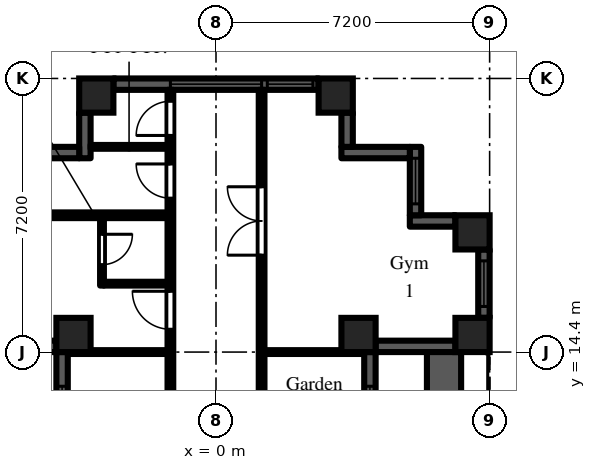
"""IFC4 building model, lengths in metres.
Left out: names, types, materials, properties, quantities, classifications, styles, units other than length and angle.
Written with IfcOpenShell. Run it as: python <this file> out.ifc"""

import sys

from ifc_helpers import new_model, si_unit, direction, frame, frame_2d, origin, origin_2d, place, context, subcontext, project, spatial, rectangle, extrude, element, fill, save


model = new_model("IFC4")
c1 = context("Model", 3, precision=1e-05, world=origin(), true_north=direction((0.0, 1.0)))
c2 = subcontext(c1, "Body", "Model", "MODEL_VIEW")
j1 = project(units=[si_unit("LENGTHUNIT", "METRE"), si_unit("PLANEANGLEUNIT", "RADIAN")], contexts=[c1])
p1 = place(None, origin())
s1 = spatial("IfcSite", under=j1, at=p1, CompositionType="ELEMENT")
p2 = place(p1, origin())
s2 = spatial("IfcBuilding", under=s1, at=p2, CompositionType="ELEMENT")
p3 = place(p2, frame((0.0, 0.0, 75.9)))
s3 = spatial("IfcBuildingStorey", under=s2, at=p3, CompositionType="ELEMENT", Elevation=75.9)
for number, where, z_axis, x_axis in (
    (1, (-3.75, 14.85, 0.0), (0.0, 0.0, 1.0), (1.0, 0.0, 0.0)),
    (2, (-3.15, 21.15, 0.0), (0.0, 0.0, 1.0), (1.0, 0.0, 0.0)),
    (3, (3.15, 21.15, 0.0), (0.0, 0.0, 1.0), (1.0, 0.0, 0.0)),
    (4, (3.75, 14.85, 0.0), (0.0, 0.0, 1.0), (1.0, 0.0, 0.0)),
    (5, (6.75, 14.85, 0.0), (0.0, 0.0, 1.0), (1.0, 0.0, 0.0)),
    (6, (6.75, 17.55, 0.0), (0.0, 0.0, 1.0), (1.0, 0.0, 0.0)),
):
    element("IfcColumn", number, at=place(p3, frame(where, z_axis=z_axis, x_axis=x_axis)), inside=s3, PredefinedType="COLUMN", context=c2, shape_type="SweptSolid", body=[
        extrude(rectangle(XDim=0.9, YDim=0.9, at=origin_2d()), origin(), (0.0, 0.0, 1.0), 3.0),
    ])
p4 = place(p3, frame((4.05, 7.2, 0.0), z_axis=(0.0, 0.0, 1.0), x_axis=(0.0, 1.0, 0.0)))
e7 = element("IfcWall", 7, at=p4, inside=s3, PredefinedType="SOLIDWALL", context=c2, shape_type="SweptSolid", body=[
    extrude(rectangle(XDim=7.2, YDim=0.3, at=frame_2d((3.6, 0.0))), origin(), (0.0, 0.0, 1.0), 2.1),
])
p5 = place(p4, frame((3.0, 0.0, 0.0)))
e8 = element("IfcOpeningElement", 8, at=p5, cuts=e7, PredefinedType="OPENING", context=c2, shape_type="SweptSolid", body=[
    extrude(rectangle(XDim=1.2, YDim=2.05, at=frame_2d((0.6, 1.025))), frame((0.0, 0.16, 0.0), z_axis=(0.0, -1.0, 0.0), x_axis=(1.0, 0.0, 0.0)), (0.0, 0.0, 1.0), 0.32),
])
p6 = place(p4, frame((0.9, 0.0, 0.2)))
e9 = element("IfcOpeningElement", 9, at=p6, cuts=e7, PredefinedType="OPENING", context=c2, shape_type="SweptSolid", body=[
    extrude(rectangle(XDim=1.8, YDim=1.85, at=frame_2d((0.9, 0.925))), frame((0.0, 0.16, 0.0), z_axis=(0.0, -1.0, 0.0), x_axis=(1.0, 0.0, 0.0)), (0.0, 0.0, 1.0), 0.32),
])
p7 = place(p4, frame((4.5, 0.0, 0.2)))
e10 = element("IfcOpeningElement", 10, at=p7, cuts=e7, PredefinedType="OPENING", context=c2, shape_type="SweptSolid", body=[
    extrude(rectangle(XDim=1.8, YDim=1.85, at=frame_2d((0.9, 0.925))), frame((0.0, 0.16, 0.0), z_axis=(0.0, -1.0, 0.0), x_axis=(1.0, 0.0, 0.0)), (0.0, 0.0, 1.0), 0.32),
])
p8 = place(p3, frame((4.2, 14.55, 0.0), z_axis=(0.0, 0.0, 1.0), x_axis=(1.0, 0.0, 0.0)))
e11 = element("IfcWall", 11, at=p8, inside=s3, PredefinedType="SOLIDWALL", context=c2, shape_type="SweptSolid", body=[
    extrude(rectangle(XDim=2.1, YDim=0.3, at=frame_2d((1.05, 0.0))), origin(), (0.0, 0.0, 1.0), 2.1),
])
p9 = place(p3, frame((7.05, 15.3, 0.0), z_axis=(0.0, 0.0, 1.0), x_axis=(0.0, 1.0, 0.0)))
e12 = element("IfcWall", 12, at=p9, inside=s3, PredefinedType="SOLIDWALL", context=c2, shape_type="SweptSolid", body=[
    extrude(rectangle(XDim=1.8, YDim=0.3, at=frame_2d((0.9, 0.0))), origin(), (0.0, 0.0, 1.0), 2.1),
])
p10 = place(p9, frame((0.3, 0.0, 0.2)))
e13 = element("IfcOpeningElement", 13, at=p10, cuts=e12, PredefinedType="OPENING", context=c2, shape_type="SweptSolid", body=[
    extrude(rectangle(XDim=1.2, YDim=1.85, at=frame_2d((0.6, 0.925))), frame((0.0, 0.16, 0.0), z_axis=(0.0, -1.0, 0.0), x_axis=(1.0, 0.0, 0.0)), (0.0, 0.0, 1.0), 0.32),
])
p11 = place(p3, frame((6.3, 17.85, 0.0), z_axis=(0.0, 0.0, 1.0), x_axis=(-1.0, 0.0, 0.0)))
e14 = element("IfcWall", 14, at=p11, inside=s3, PredefinedType="SOLIDWALL", context=c2, shape_type="SweptSolid", body=[
    extrude(rectangle(XDim=1.2, YDim=0.3, at=frame_2d((0.6, 0.0))), origin(), (0.0, 0.0, 1.0), 2.575),
])
p12 = place(p3, frame((5.25, 18.0, 0.0), z_axis=(0.0, 0.0, 1.0), x_axis=(0.0, 1.0, 0.0)))
e15 = element("IfcWall", 15, at=p12, inside=s3, PredefinedType="SOLIDWALL", context=c2, shape_type="SweptSolid", body=[
    extrude(rectangle(XDim=1.8, YDim=0.3, at=frame_2d((0.9, 0.0))), origin(), (0.0, 0.0, 1.0), 2.575),
])
p13 = place(p12, frame((0.3, 0.0, 0.2)))
e16 = element("IfcOpeningElement", 16, at=p13, cuts=e15, PredefinedType="OPENING", context=c2, shape_type="SweptSolid", body=[
    extrude(rectangle(XDim=1.2, YDim=1.85, at=frame_2d((0.6, 0.925))), frame((0.0, 0.16, 0.0), z_axis=(0.0, -1.0, 0.0), x_axis=(1.0, 0.0, 0.0)), (0.0, 0.0, 1.0), 0.32),
])
p14 = place(p3, frame((5.1, 19.65, 0.0), z_axis=(0.0, 0.0, 1.0), x_axis=(-1.0, 0.0, 0.0)))
e17 = element("IfcWall", 17, at=p14, inside=s3, PredefinedType="SOLIDWALL", context=c2, shape_type="SweptSolid", body=[
    extrude(rectangle(XDim=1.8, YDim=0.3, at=frame_2d((0.9, 0.0))), origin(), (0.0, 0.0, 1.0), 2.575),
])
p15 = place(p3, frame((3.45, 19.8, 0.0), z_axis=(0.0, 0.0, 1.0), x_axis=(0.0, 1.0, 0.0)))
e18 = element("IfcWall", 18, at=p15, inside=s3, PredefinedType="SOLIDWALL", context=c2, shape_type="SweptSolid", body=[
    extrude(rectangle(XDim=0.9, YDim=0.3, at=frame_2d((0.45, 0.0))), origin(), (0.0, 0.0, 1.0), 2.575),
])
p16 = place(p3, frame((2.7, 21.45, 0.0), z_axis=(0.0, 0.0, 1.0), x_axis=(-1.0, 0.0, 0.0)))
e19 = element("IfcWall", 19, at=p16, inside=s3, PredefinedType="SOLIDWALL", context=c2, shape_type="SweptSolid", body=[
    extrude(rectangle(XDim=5.4, YDim=0.3, at=frame_2d((2.7, 0.0))), origin(), (0.0, 0.0, 1.0), 2.1),
])
p17 = place(p16, frame((1.5, 0.0, 0.2)))
e20 = element("IfcOpeningElement", 20, at=p17, cuts=e19, PredefinedType="OPENING", context=c2, shape_type="SweptSolid", body=[
    extrude(rectangle(XDim=2.4, YDim=1.85, at=frame_2d((1.2, 0.925))), frame((0.0, 0.16, 0.0), z_axis=(0.0, -1.0, 0.0), x_axis=(1.0, 0.0, 0.0)), (0.0, 0.0, 1.0), 0.32),
])
p18 = place(p16, frame((0.15, 0.0, 0.2)))
e21 = element("IfcOpeningElement", 21, at=p18, cuts=e19, PredefinedType="OPENING", context=c2, shape_type="SweptSolid", body=[
    extrude(rectangle(XDim=1.2, YDim=1.85, at=frame_2d((0.6, 0.925))), frame((0.0, 0.16, 0.0), z_axis=(0.0, -1.0, 0.0), x_axis=(1.0, 0.0, 0.0)), (0.0, 0.0, 1.0), 0.32),
])
p19 = place(p3, frame((-3.45, 20.7, 0.0), z_axis=(0.0, 0.0, 1.0), x_axis=(0.0, -1.0, 0.0)))
e22 = element("IfcWall", 22, at=p19, inside=s3, PredefinedType="SOLIDWALL", context=c2, shape_type="SweptSolid", body=[
    extrude(rectangle(XDim=1.2, YDim=0.3, at=frame_2d((0.6, 0.0))), origin(), (0.0, 0.0, 1.0), 2.575),
])
p20 = place(p3, frame((-3.6, 19.65, 0.0), z_axis=(0.0, 0.0, 1.0), x_axis=(-1.0, 0.0, 0.0)))
e23 = element("IfcWall", 23, at=p20, inside=s3, PredefinedType="SOLIDWALL", context=c2, shape_type="SweptSolid", body=[
    extrude(rectangle(XDim=1.8, YDim=0.3, at=frame_2d((0.9, 0.0))), origin(), (0.0, 0.0, 1.0), 2.575),
])
p21 = place(p3, frame((-6.3, 14.55, 0.0), z_axis=(0.0, 0.0, 1.0), x_axis=(1.0, 0.0, 0.0)))
e24 = element("IfcWall", 24, at=p21, inside=s3, PredefinedType="SOLIDWALL", context=c2, shape_type="SweptSolid", body=[
    extrude(rectangle(XDim=2.1, YDim=0.3, at=frame_2d((1.05, 0.0))), origin(), (0.0, 0.0, 1.0), 2.1),
])
p22 = place(p3, frame((-4.05, 14.4, 0.0), z_axis=(0.0, 0.0, 1.0), x_axis=(0.0, -1.0, 0.0)))
e25 = element("IfcWall", 25, at=p22, inside=s3, PredefinedType="SOLIDWALL", context=c2, shape_type="SweptSolid", body=[
    extrude(rectangle(XDim=7.2, YDim=0.3, at=frame_2d((3.6, 0.0))), origin(), (0.0, 0.0, 1.0), 2.1),
])
p23 = place(p22, frame((3.0, 0.0, 0.0)))
e26 = element("IfcOpeningElement", 26, at=p23, cuts=e25, PredefinedType="OPENING", context=c2, shape_type="SweptSolid", body=[
    extrude(rectangle(XDim=1.2, YDim=2.05, at=frame_2d((0.6, 1.025))), frame((0.0, 0.16, 0.0), z_axis=(0.0, -1.0, 0.0), x_axis=(1.0, 0.0, 0.0)), (0.0, 0.0, 1.0), 0.32),
])
p24 = place(p22, frame((0.9, 0.0, 0.2)))
e27 = element("IfcOpeningElement", 27, at=p24, cuts=e25, PredefinedType="OPENING", context=c2, shape_type="SweptSolid", body=[
    extrude(rectangle(XDim=1.8, YDim=1.85, at=frame_2d((0.9, 0.925))), frame((0.0, 0.16, 0.0), z_axis=(0.0, -1.0, 0.0), x_axis=(1.0, 0.0, 0.0)), (0.0, 0.0, 1.0), 0.32),
])
p25 = place(p22, frame((4.5, 0.0, 0.2)))
e28 = element("IfcOpeningElement", 28, at=p25, cuts=e25, PredefinedType="OPENING", context=c2, shape_type="SweptSolid", body=[
    extrude(rectangle(XDim=1.8, YDim=1.85, at=frame_2d((0.9, 0.925))), frame((0.0, 0.16, 0.0), z_axis=(0.0, -1.0, 0.0), x_axis=(1.0, 0.0, 0.0)), (0.0, 0.0, 1.0), 0.32),
])
p26 = place(p3, frame((6.0, 7.2, 0.0), z_axis=(0.0, 0.0, 1.0), x_axis=(0.0, 1.0, 0.0)))
e29 = element("IfcWall", 29, at=p26, inside=s3, PredefinedType="PARAPET", context=c2, shape_type="SweptSolid", body=[
    extrude(rectangle(XDim=7.2, YDim=0.9, at=frame_2d((3.6, 0.0))), origin(), (0.0, 0.0, 1.0), 0.8),
])
p27 = place(p3, frame((-5.1, 18.0, 0.0), z_axis=(0.0, 0.0, 1.0), x_axis=(1.0, 0.0, 0.0)))
e30 = element("IfcWall", 30, at=p27, inside=s3, PredefinedType="PARTITIONING", context=c2, shape_type="SweptSolid", body=[
    extrude(rectangle(XDim=3.825, YDim=0.15, at=frame_2d((1.913, 0.0))), origin(), (0.0, 0.0, 1.0), 2.575),
])
p28 = place(p3, frame((-3.9, 14.4, 0.0), z_axis=(0.0, 0.0, 1.0), x_axis=(1.0, 0.0, 0.0)))
e31 = element("IfcWall", 31, at=p28, inside=s3, PredefinedType="PARTITIONING", context=c2, shape_type="SweptSolid", body=[
    extrude(rectangle(XDim=2.625, YDim=0.1, at=frame_2d((1.312, 0.0))), origin(), (0.0, 0.0, 1.0), 2.575),
])
p29 = place(p3, frame((-3.3, 19.8, 0.0), z_axis=(0.0, 0.0, 1.0), x_axis=(1.0, 0.0, 0.0)))
e32 = element("IfcWall", 32, at=p29, inside=s3, PredefinedType="PARTITIONING", context=c2, shape_type="SweptSolid", body=[
    extrude(rectangle(XDim=2.025, YDim=0.1, at=frame_2d((1.013, 0.0))), origin(), (0.0, 0.0, 1.0), 2.575),
])
p30 = place(p3, frame((-3.0, 16.15, 0.0), z_axis=(0.0, 0.0, 1.0), x_axis=(0.0, 1.0, 0.0)))
e33 = element("IfcWall", 33, at=p30, inside=s3, PredefinedType="PARTITIONING", context=c2, shape_type="SweptSolid", body=[
    extrude(rectangle(XDim=1.775, YDim=0.1, at=frame_2d((0.888, 0.0))), origin(), (0.0, 0.0, 1.0), 2.575),
])
p31 = place(p30, frame((0.55, 0.0, 0.0)))
e34 = element("IfcOpeningElement", 34, at=p31, cuts=e33, PredefinedType="OPENING", context=c2, shape_type="SweptSolid", body=[
    extrude(rectangle(XDim=0.8, YDim=2.1, at=frame_2d((0.4, 1.05))), frame((0.0, 0.06, 0.0), z_axis=(0.0, -1.0, 0.0), x_axis=(1.0, 0.0, 0.0)), (0.0, 0.0, 1.0), 0.12),
])
p32 = place(p3, frame((-2.95, 16.2, 0.0), z_axis=(0.0, 0.0, 1.0), x_axis=(1.0, 0.0, 0.0)))
e35 = element("IfcWall", 35, at=p32, inside=s3, PredefinedType="PARTITIONING", context=c2, shape_type="SweptSolid", body=[
    extrude(rectangle(XDim=1.675, YDim=0.1, at=frame_2d((0.837, 0.0))), origin(), (0.0, 0.0, 1.0), 2.575),
])
p33 = place(p3, frame((-1.2, 1.275, 0.0), z_axis=(0.0, 0.0, 1.0), x_axis=(0.0, 1.0, 0.0)))
e36 = element("IfcWall", 36, at=p33, inside=s3, PredefinedType="PARTITIONING", context=c2, shape_type="SweptSolid", body=[
    extrude(rectangle(XDim=20.025, YDim=0.15, at=frame_2d((10.013, 0.0))), origin(), (0.0, 0.0, 1.0), 2.575),
])
p34 = place(p33, frame((2.475, 0.0, 0.0)))
e37 = element("IfcOpeningElement", 37, at=p34, cuts=e36, PredefinedType="OPENING", context=c2, shape_type="SweptSolid", body=[
    extrude(rectangle(XDim=0.9, YDim=2.1, at=frame_2d((0.45, 1.05))), frame((0.0, 0.085, 0.0), z_axis=(0.0, -1.0, 0.0), x_axis=(1.0, 0.0, 0.0)), (0.0, 0.0, 1.0), 0.17),
])
p35 = place(p33, frame((10.875, 0.0, 0.0)))
e38 = element("IfcOpeningElement", 38, at=p35, cuts=e36, PredefinedType="OPENING", context=c2, shape_type="SweptSolid", body=[
    extrude(rectangle(XDim=0.9, YDim=2.1, at=frame_2d((0.45, 1.05))), frame((0.0, 0.085, 0.0), z_axis=(0.0, -1.0, 0.0), x_axis=(1.0, 0.0, 0.0)), (0.0, 0.0, 1.0), 0.17),
])
p36 = place(p33, frame((13.725, 0.0, 0.0)))
e39 = element("IfcOpeningElement", 39, at=p36, cuts=e36, PredefinedType="OPENING", context=c2, shape_type="SweptSolid", body=[
    extrude(rectangle(XDim=1.0, YDim=2.1, at=frame_2d((0.5, 1.05))), frame((0.0, 0.085, 0.0), z_axis=(0.0, -1.0, 0.0), x_axis=(1.0, 0.0, 0.0)), (0.0, 0.0, 1.0), 0.17),
])
p37 = place(p33, frame((17.175, 0.0, 0.0)))
e40 = element("IfcOpeningElement", 40, at=p37, cuts=e36, PredefinedType="OPENING", context=c2, shape_type="SweptSolid", body=[
    extrude(rectangle(XDim=0.9, YDim=2.1, at=frame_2d((0.45, 1.05))), frame((0.0, 0.085, 0.0), z_axis=(0.0, -1.0, 0.0), x_axis=(1.0, 0.0, 0.0)), (0.0, 0.0, 1.0), 0.17),
])
p38 = place(p33, frame((18.825, 0.0, 0.0)))
e41 = element("IfcOpeningElement", 41, at=p38, cuts=e36, PredefinedType="OPENING", context=c2, shape_type="SweptSolid", body=[
    extrude(rectangle(XDim=0.9, YDim=2.1, at=frame_2d((0.45, 1.05))), frame((0.0, 0.085, 0.0), z_axis=(0.0, -1.0, 0.0), x_axis=(1.0, 0.0, 0.0)), (0.0, 0.0, 1.0), 0.17),
])
p39 = place(p3, frame((1.2, 1.125, 0.0), z_axis=(0.0, 0.0, 1.0), x_axis=(0.0, 1.0, 0.0)))
e42 = element("IfcWall", 42, at=p39, inside=s3, PredefinedType="PARTITIONING", context=c2, shape_type="SweptSolid", body=[
    extrude(rectangle(XDim=20.175, YDim=0.15, at=frame_2d((10.087, 0.0))), origin(), (0.0, 0.0, 1.0), 2.575),
])
p40 = place(p39, frame((2.625, 0.0, 0.0)))
e43 = element("IfcOpeningElement", 43, at=p40, cuts=e42, PredefinedType="OPENING", context=c2, shape_type="SweptSolid", body=[
    extrude(rectangle(XDim=0.9, YDim=2.1, at=frame_2d((0.45, 1.05))), frame((0.0, 0.085, 0.0), z_axis=(0.0, -1.0, 0.0), x_axis=(1.0, 0.0, 0.0)), (0.0, 0.0, 1.0), 0.17),
])
p41 = place(p39, frame((7.425, 0.0, 0.0)))
e44 = element("IfcOpeningElement", 44, at=p41, cuts=e42, PredefinedType="OPENING", context=c2, shape_type="SweptSolid", body=[
    extrude(rectangle(XDim=0.9, YDim=2.1, at=frame_2d((0.45, 1.05))), frame((0.0, 0.085, 0.0), z_axis=(0.0, -1.0, 0.0), x_axis=(1.0, 0.0, 0.0)), (0.0, 0.0, 1.0), 0.17),
])
p42 = place(p39, frame((15.825, 0.0, 0.0)))
e45 = element("IfcOpeningElement", 45, at=p42, cuts=e42, PredefinedType="OPENING", context=c2, shape_type="SweptSolid", body=[
    extrude(rectangle(XDim=1.8, YDim=2.1, at=frame_2d((0.9, 1.05))), frame((0.0, 0.085, 0.0), z_axis=(0.0, -1.0, 0.0), x_axis=(1.0, 0.0, 0.0)), (0.0, 0.0, 1.0), 0.17),
])
p43 = place(p3, frame((1.275, 14.4, 0.0), z_axis=(0.0, 0.0, 1.0), x_axis=(1.0, 0.0, 0.0)))
e46 = element("IfcWall", 46, at=p43, inside=s3, PredefinedType="PARTITIONING", context=c2, shape_type="SweptSolid", body=[
    extrude(rectangle(XDim=2.625, YDim=0.1, at=frame_2d((1.312, 0.0))), origin(), (0.0, 0.0, 1.0), 2.575),
])
p44 = place(p7, origin())
e47 = element("IfcWindow", 47, at=p44, inside=s3, PartitioningType="SINGLE_PANEL", PredefinedType="WINDOW", context=c2, shape_type="SweptSolid", body=[
    extrude(rectangle(XDim=1.8, YDim=1.85, at=frame_2d((0.9, 0.925))), frame((0.0, 0.03, 0.0), z_axis=(0.0, -1.0, 0.0), x_axis=(1.0, 0.0, 0.0)), (0.0, 0.0, 1.0), 0.06),
])
fill(e10, e47)
p45 = place(p10, origin())
e48 = element("IfcWindow", 48, at=p45, inside=s3, PartitioningType="SINGLE_PANEL", PredefinedType="WINDOW", context=c2, shape_type="SweptSolid", body=[
    extrude(rectangle(XDim=1.2, YDim=1.85, at=frame_2d((0.6, 0.925))), frame((0.0, 0.03, 0.0), z_axis=(0.0, -1.0, 0.0), x_axis=(1.0, 0.0, 0.0)), (0.0, 0.0, 1.0), 0.06),
])
fill(e13, e48)
p46 = place(p13, origin())
e49 = element("IfcWindow", 49, at=p46, inside=s3, PartitioningType="SINGLE_PANEL", PredefinedType="WINDOW", context=c2, shape_type="SweptSolid", body=[
    extrude(rectangle(XDim=1.2, YDim=1.85, at=frame_2d((0.6, 0.925))), frame((0.0, 0.03, 0.0), z_axis=(0.0, -1.0, 0.0), x_axis=(1.0, 0.0, 0.0)), (0.0, 0.0, 1.0), 0.06),
])
fill(e16, e49)
p47 = place(p17, origin())
e50 = element("IfcWindow", 50, at=p47, inside=s3, PartitioningType="SINGLE_PANEL", PredefinedType="WINDOW", context=c2, shape_type="SweptSolid", body=[
    extrude(rectangle(XDim=2.4, YDim=1.85, at=frame_2d((1.2, 0.925))), frame((0.0, 0.03, 0.0), z_axis=(0.0, -1.0, 0.0), x_axis=(1.0, 0.0, 0.0)), (0.0, 0.0, 1.0), 0.06),
])
fill(e20, e50)
p48 = place(p18, origin())
e51 = element("IfcWindow", 51, at=p48, inside=s3, PartitioningType="SINGLE_PANEL", PredefinedType="WINDOW", context=c2, shape_type="SweptSolid", body=[
    extrude(rectangle(XDim=1.2, YDim=1.85, at=frame_2d((0.6, 0.925))), frame((0.0, 0.03, 0.0), z_axis=(0.0, -1.0, 0.0), x_axis=(1.0, 0.0, 0.0)), (0.0, 0.0, 1.0), 0.06),
])
fill(e21, e51)
p49 = place(p24, origin())
e52 = element("IfcWindow", 52, at=p49, inside=s3, PartitioningType="SINGLE_PANEL", PredefinedType="WINDOW", context=c2, shape_type="SweptSolid", body=[
    extrude(rectangle(XDim=1.8, YDim=1.85, at=frame_2d((0.9, 0.925))), frame((0.0, 0.03, 0.0), z_axis=(0.0, -1.0, 0.0), x_axis=(1.0, 0.0, 0.0)), (0.0, 0.0, 1.0), 0.06),
])
fill(e27, e52)
p50 = place(p31, frame((0.8, 0.0, 0.0), z_axis=(0.0, 0.0, 1.0), x_axis=(-1.0, 0.0, 0.0)))
e53 = element("IfcDoor", 53, at=p50, inside=s3, OperationType="SINGLE_SWING_LEFT", PredefinedType="DOOR", context=c2, shape_type="SweptSolid", body=[
    extrude(rectangle(XDim=0.8, YDim=2.1, at=frame_2d((0.4, 1.05))), frame((0.0, 0.025, 0.0), z_axis=(0.0, -1.0, 0.0), x_axis=(1.0, 0.0, 0.0)), (0.0, 0.0, 1.0), 0.05),
])
fill(e34, e53)
p51 = place(p36, origin())
e54 = element("IfcDoor", 54, at=p51, inside=s3, OperationType="SINGLE_SWING_RIGHT", PredefinedType="DOOR", context=c2, shape_type="SweptSolid", body=[
    extrude(rectangle(XDim=1.0, YDim=2.1, at=frame_2d((0.5, 1.05))), frame((0.0, 0.025, 0.0), z_axis=(0.0, -1.0, 0.0), x_axis=(1.0, 0.0, 0.0)), (0.0, 0.0, 1.0), 0.05),
])
fill(e39, e54)
p52 = place(p37, origin())
e55 = element("IfcDoor", 55, at=p52, inside=s3, OperationType="SINGLE_SWING_RIGHT", PredefinedType="DOOR", context=c2, shape_type="SweptSolid", body=[
    extrude(rectangle(XDim=0.9, YDim=2.1, at=frame_2d((0.45, 1.05))), frame((0.0, 0.025, 0.0), z_axis=(0.0, -1.0, 0.0), x_axis=(1.0, 0.0, 0.0)), (0.0, 0.0, 1.0), 0.05),
])
fill(e40, e55)
p53 = place(p38, origin())
e56 = element("IfcDoor", 56, at=p53, inside=s3, OperationType="SINGLE_SWING_LEFT", PredefinedType="DOOR", context=c2, shape_type="SweptSolid", body=[
    extrude(rectangle(XDim=0.9, YDim=2.1, at=frame_2d((0.45, 1.05))), frame((0.0, 0.025, 0.0), z_axis=(0.0, -1.0, 0.0), x_axis=(1.0, 0.0, 0.0)), (0.0, 0.0, 1.0), 0.05),
])
fill(e41, e56)
p54 = place(p42, origin())
e57 = element("IfcDoor", 57, at=p54, inside=s3, OperationType="DOUBLE_DOOR_DOUBLE_SWING", PredefinedType="DOOR", context=c2, shape_type="SweptSolid", body=[
    extrude(rectangle(XDim=1.8, YDim=2.1, at=frame_2d((0.9, 1.05))), frame((0.0, 0.025, 0.0), z_axis=(0.0, -1.0, 0.0), x_axis=(1.0, 0.0, 0.0)), (0.0, 0.0, 1.0), 0.05),
])
fill(e45, e57)
save(model, sys.argv[1])
